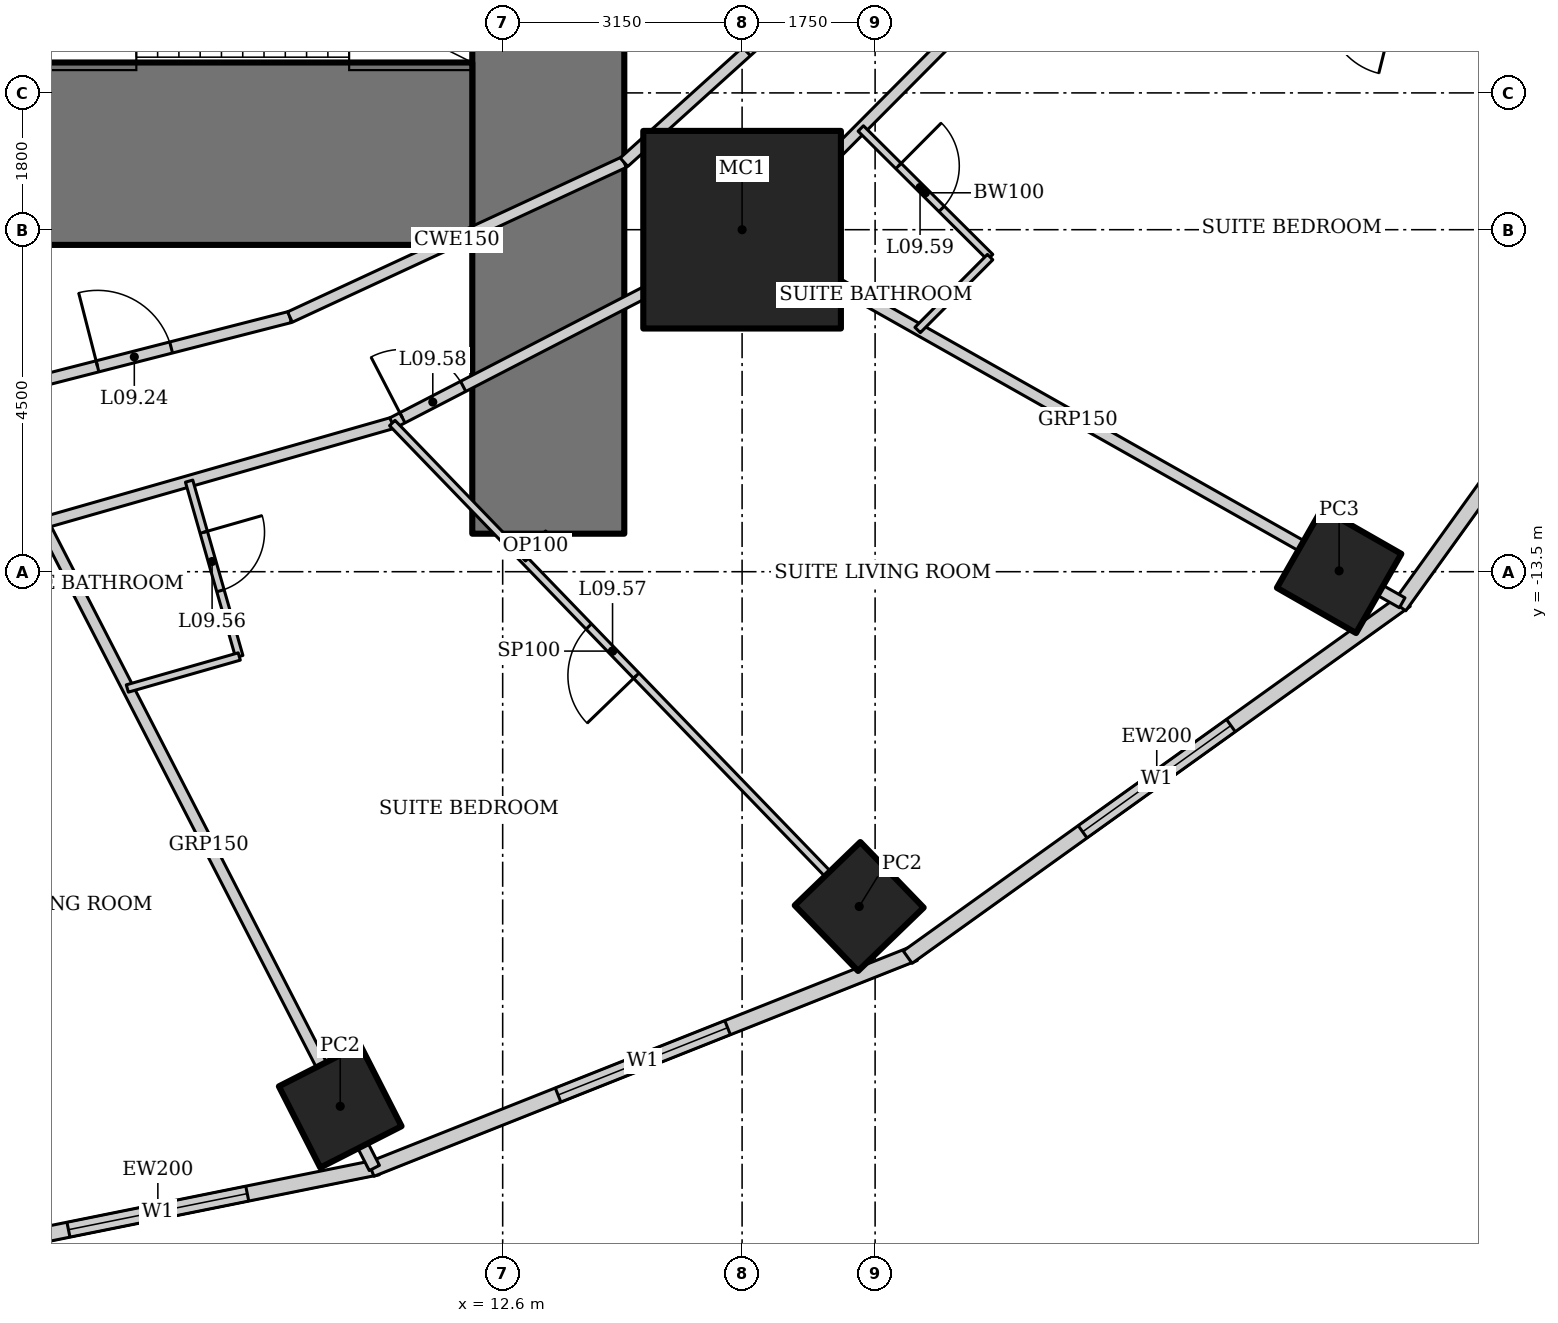
"""IFC4 building model, lengths in metres.
Left out: names, types, materials, properties, quantities, classifications, styles, units other than length and angle.
Written with IfcOpenShell. Run it as: python <this file> out.ifc"""

import sys

from ifc_helpers import new_model, si_unit, direction, frame, frame_2d, origin, origin_2d, place, context, subcontext, project, spatial, rectangle, hollow_rectangle, extrude, element, fill, save


model = new_model("IFC4")
c1 = context("Model", 3, precision=1e-05, world=origin(), true_north=direction((0.0, 1.0)))
c2 = subcontext(c1, "Body", "Model", "MODEL_VIEW")
j1 = project(units=[si_unit("LENGTHUNIT", "METRE"), si_unit("PLANEANGLEUNIT", "RADIAN")], contexts=[c1])
p1 = place(None, origin())
s1 = spatial("IfcSite", under=j1, at=p1, CompositionType="ELEMENT")
p2 = place(p1, origin())
s2 = spatial("IfcBuilding", under=s1, at=p2, CompositionType="ELEMENT")
p3 = place(p2, frame((0.0, 0.0, 47.8)))
s3 = spatial("IfcBuildingStorey", under=s2, at=p3, CompositionType="ELEMENT", Elevation=47.8)
p4 = place(p3, frame((15.75, -9.0, 0.0), z_axis=(0.0, 0.0, 1.0), x_axis=(1.0, 0.0, 0.0)))
e1 = element("IfcColumn", 1, at=p4, inside=s3, PredefinedType="COLUMN", context=c2, shape_type="SweptSolid", body=[
    extrude(hollow_rectangle(XDim=2.6, YDim=2.6, WallThickness=0.13, at=origin_2d()), origin(), (0.0, 0.0, 1.0), 3.6),
])
for number, where, z_axis, x_axis in (
    (2, (10.463, -20.534, 0.0), (0.0, 0.0, 1.0), (0.891, 0.454, 0.0)),
    (3, (17.291, -17.905, 0.0), (0.0, 0.0, 1.0), (0.719, 0.695, 0.0)),
):
    element("IfcColumn", number, at=place(p3, frame(where, z_axis=z_axis, x_axis=x_axis)), inside=s3, PredefinedType="COLUMN", context=c2, shape_type="SweptSolid", body=[
        extrude(hollow_rectangle(XDim=1.2, YDim=1.2, WallThickness=0.1, at=origin_2d()), origin(), (0.0, 0.0, 1.0), 3.6),
    ])
p5 = place(p3, frame((23.605, -13.489, 0.0), z_axis=(0.0, 0.0, 1.0), x_axis=(0.496139221777, 0.86824298017, 0.0)))
e4 = element("IfcColumn", 4, at=p5, inside=s3, PredefinedType="COLUMN", context=c2, shape_type="SweptSolid", body=[
    extrude(hollow_rectangle(XDim=1.2, YDim=1.2, WallThickness=0.12, at=origin_2d()), origin(), (0.0, 0.0, 1.0), 3.6),
])
p6 = place(p3, frame((13.2, -13.0, 0.0), z_axis=(0.0, 0.0, 1.0), x_axis=(0.0, 1.0, 0.0)))
e5 = element("IfcWall", 5, at=p6, inside=s3, PredefinedType="SHEAR", context=c2, shape_type="SweptSolid", body=[
    extrude(rectangle(XDim=26.0, YDim=2.0, at=frame_2d((13.0, 0.0))), origin(), (0.0, 0.0, 1.0), 3.6),
])
p7 = place(p6, frame((12.1, 0.0, 0.0)))
e6 = element("IfcOpeningElement", 6, at=p7, cuts=e5, PredefinedType="OPENING", context=c2, shape_type="SweptSolid", body=[
    extrude(rectangle(XDim=1.8, YDim=2.1, at=frame_2d((0.9, 1.05))), frame((0.0, 1.01, 0.0), z_axis=(0.0, -1.0, 0.0), x_axis=(1.0, 0.0, 0.0)), (0.0, 0.0, 1.0), 2.02),
])
p8 = place(p3, frame((-12.2, -8.0, 0.0), z_axis=(0.0, 0.0, 1.0), x_axis=(1.0, 0.0, 0.0)))
e7 = element("IfcWall", 7, at=p8, inside=s3, PredefinedType="SHEAR", context=c2, shape_type="SweptSolid", body=[
    extrude(rectangle(XDim=24.4, YDim=2.4, at=frame_2d((12.2, 0.0))), origin(), (0.0, 0.0, 1.0), 3.6),
])
p9 = place(p3, frame((5.17, -22.504, 0.0), z_axis=(0.0, 0.0, 1.0), x_axis=(0.980251657452, 0.197754110105, 0.0)))
e8 = element("IfcWall", 8, at=p9, inside=s3, PredefinedType="SOLIDWALL", context=c2, shape_type="SweptSolid", body=[
    extrude(rectangle(XDim=5.904, YDim=0.2, at=frame_2d((2.952, 0.0))), origin(), (0.0, 0.0, 1.0), 3.45),
])
p10 = place(p9, frame((1.752, 0.0, 0.5)))
e9 = element("IfcOpeningElement", 9, at=p10, cuts=e8, PredefinedType="OPENING", context=c2, shape_type="SweptSolid", body=[
    extrude(rectangle(XDim=2.4, YDim=2.2, at=frame_2d((1.2, 1.1))), frame((0.0, 0.11, 0.0), z_axis=(0.0, -1.0, 0.0), x_axis=(1.0, 0.0, 0.0)), (0.0, 0.0, 1.0), 0.22),
])
p11 = place(p3, frame((10.869, -21.363, 0.0), z_axis=(0.0, 0.0, 1.0), x_axis=(0.929358351251, 0.369178892895, 0.0)))
e10 = element("IfcWall", 10, at=p11, inside=s3, PredefinedType="SOLIDWALL", context=c2, shape_type="SweptSolid", body=[
    extrude(rectangle(XDim=7.692, YDim=0.2, at=frame_2d((3.846, 0.0))), origin(), (0.0, 0.0, 1.0), 3.45),
])
p12 = place(p11, frame((2.646, 0.0, 0.5)))
e11 = element("IfcOpeningElement", 11, at=p12, cuts=e10, PredefinedType="OPENING", context=c2, shape_type="SweptSolid", body=[
    extrude(rectangle(XDim=2.4, YDim=2.2, at=frame_2d((1.2, 1.1))), frame((0.0, 0.11, 0.0), z_axis=(0.0, -1.0, 0.0), x_axis=(1.0, 0.0, 0.0)), (0.0, 0.0, 1.0), 0.22),
])
p13 = place(p3, frame((17.929, -18.572, 0.0), z_axis=(0.0, 0.0, 1.0), x_axis=(0.812791321576, 0.582554948112, 0.0)))
e12 = element("IfcWall", 12, at=p13, inside=s3, PredefinedType="SOLIDWALL", context=c2, shape_type="SweptSolid", body=[
    extrude(rectangle(XDim=8.063, YDim=0.2, at=frame_2d((4.032, 0.0))), origin(), (0.0, 0.0, 1.0), 3.45),
])
p14 = place(p13, frame((2.832, 0.0, 0.5)))
e13 = element("IfcOpeningElement", 13, at=p14, cuts=e12, PredefinedType="OPENING", context=c2, shape_type="SweptSolid", body=[
    extrude(rectangle(XDim=2.4, YDim=2.2, at=frame_2d((1.2, 1.1))), frame((0.0, 0.11, 0.0), z_axis=(0.0, -1.0, 0.0), x_axis=(1.0, 0.0, 0.0)), (0.0, 0.0, 1.0), 0.22),
])
p15 = place(p3, frame((24.4, -13.957, 0.0), z_axis=(0.0, 0.0, 1.0), x_axis=(0.583937613703, 0.811798536155, 0.0)))
e14 = element("IfcWall", 14, at=p15, inside=s3, PredefinedType="SOLIDWALL", context=c2, shape_type="SweptSolid", body=[
    extrude(rectangle(XDim=8.323, YDim=0.2, at=frame_2d((4.162, 0.0))), origin(), (0.0, 0.0, 1.0), 3.45),
])
p16 = place(p15, frame((2.961, 0.0, 0.5)))
e15 = element("IfcOpeningElement", 15, at=p16, cuts=e14, PredefinedType="OPENING", context=c2, shape_type="SweptSolid", body=[
    extrude(rectangle(XDim=2.4, YDim=2.2, at=frame_2d((1.2, 1.1))), frame((0.0, 0.11, 0.0), z_axis=(0.0, -1.0, 0.0), x_axis=(1.0, 0.0, 0.0)), (0.0, 0.0, 1.0), 0.22),
])
p17 = place(p3, frame((10.912, -21.346, 0.0), z_axis=(0.0, 0.0, 1.0), x_axis=(-0.456950233066, 0.889492262193, 0.0)))
e16 = element("IfcWall", 16, at=p17, inside=s3, PredefinedType="PARTITIONING", context=c2, shape_type="SweptSolid", body=[
    extrude(rectangle(XDim=9.542, YDim=0.15, at=frame_2d((4.771, 0.0))), origin(), (0.0, 0.0, 1.0), 2.528),
])
p18 = place(p3, frame((24.435, -13.909, 0.0), z_axis=(0.0, 0.0, 1.0), x_axis=(-0.870612006791, 0.491970256856, 0.0)))
e17 = element("IfcWall", 17, at=p18, inside=s3, PredefinedType="PARTITIONING", context=c2, shape_type="SweptSolid", body=[
    extrude(rectangle(XDim=9.802, YDim=0.15, at=frame_2d((4.901, 0.0))), origin(), (0.0, 0.0, 1.0), 2.693),
])
p19 = place(p3, frame((6.552, -12.858, 0.0), z_axis=(0.0, 0.0, 1.0), x_axis=(0.961464178199, 0.27493023486, 0.0)))
e18 = element("IfcWall", 18, at=p19, inside=s3, PredefinedType="PARTITIONING", context=c2, shape_type="SweptSolid", body=[
    extrude(rectangle(XDim=4.78, YDim=0.15, at=frame_2d((2.39, 0.0))), origin(), (0.0, 0.0, 1.0), 3.45),
])
p20 = place(p3, frame((11.147, -11.544, 0.0), z_axis=(0.0, 0.0, 1.0), x_axis=(0.888333171507, 0.459199495209, 0.0)))
e19 = element("IfcWall", 19, at=p20, inside=s3, PredefinedType="PARTITIONING", context=c2, shape_type="SweptSolid", body=[
    extrude(rectangle(XDim=5.351, YDim=0.15, at=frame_2d((2.676, 0.0))), origin(), (0.0, 0.0, 1.0), 3.45),
])
p21 = place(p20, frame((0.15, 0.0, 0.0)))
e20 = element("IfcOpeningElement", 20, at=p21, cuts=e19, PredefinedType="OPENING", context=c2, shape_type="SweptSolid", body=[
    extrude(rectangle(XDim=0.9, YDim=2.1, at=frame_2d((0.45, 1.05))), frame((0.0, 0.085, 0.0), z_axis=(0.0, -1.0, 0.0), x_axis=(1.0, 0.0, 0.0)), (0.0, 0.0, 1.0), 0.17),
])
p22 = place(p3, frame((15.901, -9.086, 0.0), z_axis=(0.0, 0.0, 1.0), x_axis=(0.705121546414, 0.709086457904, 0.0)))
e21 = element("IfcWall", 21, at=p22, inside=s3, PredefinedType="PARTITIONING", context=c2, shape_type="SweptSolid", body=[
    extrude(rectangle(XDim=5.788, YDim=0.15, at=frame_2d((2.894, 0.0))), origin(), (0.0, 0.0, 1.0), 3.45),
])
p23 = place(p3, frame((5.706, -11.198, 0.0), z_axis=(0.0, 0.0, 1.0), x_axis=(0.968705891355, 0.248211393886, 0.0)))
e22 = element("IfcWall", 22, at=p23, inside=s3, PredefinedType="PARTITIONING", context=c2, shape_type="SweptSolid", body=[
    extrude(rectangle(XDim=4.228, YDim=0.15, at=frame_2d((2.114, 0.0))), origin(), (0.0, 0.0, 1.0), 3.45),
])
p24 = place(p23, frame((1.614, 0.0, 0.0)))
e23 = element("IfcOpeningElement", 23, at=p24, cuts=e22, PredefinedType="OPENING", context=c2, shape_type="SweptSolid", body=[
    extrude(rectangle(XDim=1.0, YDim=2.1, at=frame_2d((0.5, 1.05))), frame((0.0, 0.085, 0.0), z_axis=(0.0, -1.0, 0.0), x_axis=(1.0, 0.0, 0.0)), (0.0, 0.0, 1.0), 0.17),
])
p25 = place(p3, frame((9.801, -10.149, 0.0), z_axis=(0.0, 0.0, 1.0), x_axis=(0.907279653965, 0.420527798727, 0.0)))
e24 = element("IfcWall", 24, at=p25, inside=s3, PredefinedType="PARTITIONING", context=c2, shape_type="SweptSolid", body=[
    extrude(rectangle(XDim=4.844, YDim=0.15, at=frame_2d((2.422, 0.0))), origin(), (0.0, 0.0, 1.0), 3.45),
])
p26 = place(p3, frame((14.196, -8.112, 0.0), z_axis=(0.0, 0.0, 1.0), x_axis=(0.742194222, 0.670184852731, 0.0)))
e25 = element("IfcWall", 25, at=p26, inside=s3, PredefinedType="PARTITIONING", context=c2, shape_type="SweptSolid", body=[
    extrude(rectangle(XDim=5.347, YDim=0.15, at=frame_2d((2.673, 0.0))), origin(), (0.0, 0.0, 1.0), 3.45),
])
p27 = place(p26, frame((2.173, 0.0, 0.0)))
e26 = element("IfcOpeningElement", 26, at=p27, cuts=e25, PredefinedType="OPENING", context=c2, shape_type="SweptSolid", body=[
    extrude(rectangle(XDim=1.0, YDim=2.1, at=frame_2d((0.5, 1.05))), frame((0.0, 0.085, 0.0), z_axis=(0.0, -1.0, 0.0), x_axis=(1.0, 0.0, 0.0)), (0.0, 0.0, 1.0), 0.17),
])
p28 = place(p3, frame((8.474, -12.308, 0.0), z_axis=(0.0, 0.0, 1.0), x_axis=(0.27497640313, -0.961450975205, 0.0)))
e27 = element("IfcWall", 27, at=p28, inside=s3, PredefinedType="PARTITIONING", context=c2, shape_type="SweptSolid", body=[
    extrude(rectangle(XDim=2.4, YDim=0.1, at=frame_2d((1.2, 0.0))), origin(), (0.0, 0.0, 1.0), 3.45),
])
p29 = place(p28, frame((0.7, 0.0, 0.0)))
e28 = element("IfcOpeningElement", 28, at=p29, cuts=e27, PredefinedType="OPENING", context=c2, shape_type="SweptSolid", body=[
    extrude(rectangle(XDim=0.8, YDim=2.1, at=frame_2d((0.4, 1.05))), frame((0.0, 0.06, 0.0), z_axis=(0.0, -1.0, 0.0), x_axis=(1.0, 0.0, 0.0)), (0.0, 0.0, 1.0), 0.12),
])
p30 = place(p3, frame((9.134, -14.615, 0.0), z_axis=(0.0, 0.0, 1.0), x_axis=(-0.96145775668, -0.274952690695, 0.0)))
e29 = element("IfcWall", 29, at=p30, inside=s3, PredefinedType="PARTITIONING", context=c2, shape_type="SweptSolid", body=[
    extrude(rectangle(XDim=1.532, YDim=0.1, at=frame_2d((0.766, 0.0))), origin(), (0.0, 0.0, 1.0), 3.45),
])
p31 = place(p3, frame((16.944, -17.545, 0.0), z_axis=(0.0, 0.0, 1.0), x_axis=(-0.694680670522, 0.71931826475, 0.0)))
e30 = element("IfcWall", 30, at=p31, inside=s3, PredefinedType="PARTITIONING", context=c2, shape_type="SweptSolid", body=[
    extrude(rectangle(XDim=8.344, YDim=0.1, at=frame_2d((4.172, 0.0))), origin(), (0.0, 0.0, 1.0), 2.528),
])
p32 = place(p31, frame((3.722, 0.0, 0.0)))
e31 = element("IfcOpeningElement", 31, at=p32, cuts=e30, PredefinedType="OPENING", context=c2, shape_type="SweptSolid", body=[
    extrude(rectangle(XDim=0.9, YDim=2.1, at=frame_2d((0.45, 1.05))), frame((0.0, 0.06, 0.0), z_axis=(0.0, -1.0, 0.0), x_axis=(1.0, 0.0, 0.0)), (0.0, 0.0, 1.0), 0.12),
])
p33 = place(p3, frame((17.311, -7.668, 0.0), z_axis=(0.0, 0.0, 1.0), x_axis=(0.709138392716, -0.705069315724, 0.0)))
e32 = element("IfcWall", 32, at=p33, inside=s3, PredefinedType="PARTITIONING", context=c2, shape_type="SweptSolid", body=[
    extrude(rectangle(XDim=2.4, YDim=0.1, at=frame_2d((1.2, 0.0))), origin(), (0.0, 0.0, 1.0), 3.45),
])
p34 = place(p33, frame((0.7, 0.0, 0.0)))
e33 = element("IfcOpeningElement", 33, at=p34, cuts=e32, PredefinedType="OPENING", context=c2, shape_type="SweptSolid", body=[
    extrude(rectangle(XDim=0.8, YDim=2.1, at=frame_2d((0.4, 1.05))), frame((0.0, 0.06, 0.0), z_axis=(0.0, -1.0, 0.0), x_axis=(1.0, 0.0, 0.0)), (0.0, 0.0, 1.0), 0.12),
])
p35 = place(p3, frame((19.013, -9.36, 0.0), z_axis=(0.0, 0.0, 1.0), x_axis=(-0.7051187611, -0.709089227633, 0.0)))
e34 = element("IfcWall", 34, at=p35, inside=s3, PredefinedType="PARTITIONING", context=c2, shape_type="SweptSolid", body=[
    extrude(rectangle(XDim=1.353, YDim=0.1, at=frame_2d((0.676, 0.0))), origin(), (0.0, 0.0, 1.0), 3.45),
])
p36 = place(p3, frame((27.833, -6.939, 0.0), z_axis=(0.0, 0.0, 1.0), x_axis=(-0.97029673161, 0.24191786339, 0.0)))
e35 = element("IfcWall", 35, at=p36, inside=s3, PredefinedType="PARTITIONING", context=c2, shape_type="SweptSolid", body=[
    extrude(rectangle(XDim=8.091, YDim=0.1, at=frame_2d((4.045, 0.0))), origin(), (0.0, 0.0, 1.0), 2.332),
])
p37 = place(p36, frame((3.595, 0.0, 0.0)))
e36 = element("IfcOpeningElement", 36, at=p37, cuts=e35, PredefinedType="OPENING", context=c2, shape_type="SweptSolid", body=[
    extrude(rectangle(XDim=0.9, YDim=2.1, at=frame_2d((0.45, 1.05))), frame((0.0, 0.06, 0.0), z_axis=(0.0, -1.0, 0.0), x_axis=(1.0, 0.0, 0.0)), (0.0, 0.0, 1.0), 0.12),
])
p38 = place(p3, frame((13.2, -13.0, 0.0), z_axis=(0.0, 0.0, 1.0), x_axis=(-0.719347134512, -0.69465077562, 0.0)))
e37 = element("IfcWall", 37, at=p38, inside=s3, PredefinedType="PARTITIONING", context=c2, shape_type="SweptSolid", body=[
    extrude(rectangle(XDim=0.465, YDim=0.1, at=frame_2d((0.232, 0.0))), origin(), (0.0, 0.0, 1.0), 3.45),
])
p39 = place(p10, origin())
e38 = element("IfcWindow", 38, at=p39, inside=s3, PartitioningType="SINGLE_PANEL", PredefinedType="WINDOW", context=c2, shape_type="SweptSolid", body=[
    extrude(rectangle(XDim=2.4, YDim=2.2, at=frame_2d((1.2, 1.1))), frame((0.0, 0.03, 0.0), z_axis=(0.0, -1.0, 0.0), x_axis=(1.0, 0.0, 0.0)), (0.0, 0.0, 1.0), 0.06),
])
fill(e9, e38)
p40 = place(p12, origin())
e39 = element("IfcWindow", 39, at=p40, inside=s3, PartitioningType="SINGLE_PANEL", PredefinedType="WINDOW", context=c2, shape_type="SweptSolid", body=[
    extrude(rectangle(XDim=2.4, YDim=2.2, at=frame_2d((1.2, 1.1))), frame((0.0, 0.03, 0.0), z_axis=(0.0, -1.0, 0.0), x_axis=(1.0, 0.0, 0.0)), (0.0, 0.0, 1.0), 0.06),
])
fill(e11, e39)
p41 = place(p14, origin())
e40 = element("IfcWindow", 40, at=p41, inside=s3, PartitioningType="SINGLE_PANEL", PredefinedType="WINDOW", context=c2, shape_type="SweptSolid", body=[
    extrude(rectangle(XDim=2.4, YDim=2.2, at=frame_2d((1.2, 1.1))), frame((0.0, 0.03, 0.0), z_axis=(0.0, -1.0, 0.0), x_axis=(1.0, 0.0, 0.0)), (0.0, 0.0, 1.0), 0.06),
])
fill(e13, e40)
p42 = place(p27, origin())
e41 = element("IfcDoor", 41, at=p42, inside=s3, OperationType="SINGLE_SWING_LEFT", PredefinedType="DOOR", context=c2, shape_type="SweptSolid", body=[
    extrude(rectangle(XDim=1.0, YDim=2.1, at=frame_2d((0.5, 1.05))), frame((0.0, 0.025, 0.0), z_axis=(0.0, -1.0, 0.0), x_axis=(1.0, 0.0, 0.0)), (0.0, 0.0, 1.0), 0.05),
])
fill(e26, e41)
p43 = place(p24, origin())
e42 = element("IfcDoor", 42, at=p43, inside=s3, OperationType="SINGLE_SWING_LEFT", PredefinedType="DOOR", context=c2, shape_type="SweptSolid", body=[
    extrude(rectangle(XDim=1.0, YDim=2.1, at=frame_2d((0.5, 1.05))), frame((0.0, 0.025, 0.0), z_axis=(0.0, -1.0, 0.0), x_axis=(1.0, 0.0, 0.0)), (0.0, 0.0, 1.0), 0.05),
])
fill(e23, e42)
p44 = place(p29, origin())
e43 = element("IfcDoor", 43, at=p44, inside=s3, OperationType="SINGLE_SWING_LEFT", PredefinedType="DOOR", context=c2, shape_type="SweptSolid", body=[
    extrude(rectangle(XDim=0.8, YDim=2.1, at=frame_2d((0.4, 1.05))), frame((0.0, 0.025, 0.0), z_axis=(0.0, -1.0, 0.0), x_axis=(1.0, 0.0, 0.0)), (0.0, 0.0, 1.0), 0.05),
])
fill(e28, e43)
p45 = place(p32, origin())
e44 = element("IfcDoor", 44, at=p45, inside=s3, OperationType="SINGLE_SWING_LEFT", PredefinedType="DOOR", context=c2, shape_type="SweptSolid", body=[
    extrude(rectangle(XDim=0.9, YDim=2.1, at=frame_2d((0.45, 1.05))), frame((0.0, 0.025, 0.0), z_axis=(0.0, -1.0, 0.0), x_axis=(1.0, 0.0, 0.0)), (0.0, 0.0, 1.0), 0.05),
])
fill(e31, e44)
p46 = place(p21, origin())
e45 = element("IfcDoor", 45, at=p46, inside=s3, OperationType="SINGLE_SWING_LEFT", PredefinedType="DOOR", context=c2, shape_type="SweptSolid", body=[
    extrude(rectangle(XDim=0.9, YDim=2.1, at=frame_2d((0.45, 1.05))), frame((0.0, 0.025, 0.0), z_axis=(0.0, -1.0, 0.0), x_axis=(1.0, 0.0, 0.0)), (0.0, 0.0, 1.0), 0.05),
])
fill(e20, e45)
p47 = place(p34, origin())
e46 = element("IfcDoor", 46, at=p47, inside=s3, OperationType="SINGLE_SWING_LEFT", PredefinedType="DOOR", context=c2, shape_type="SweptSolid", body=[
    extrude(rectangle(XDim=0.8, YDim=2.1, at=frame_2d((0.4, 1.05))), frame((0.0, 0.025, 0.0), z_axis=(0.0, -1.0, 0.0), x_axis=(1.0, 0.0, 0.0)), (0.0, 0.0, 1.0), 0.05),
])
fill(e33, e46)
save(model, sys.argv[1])
